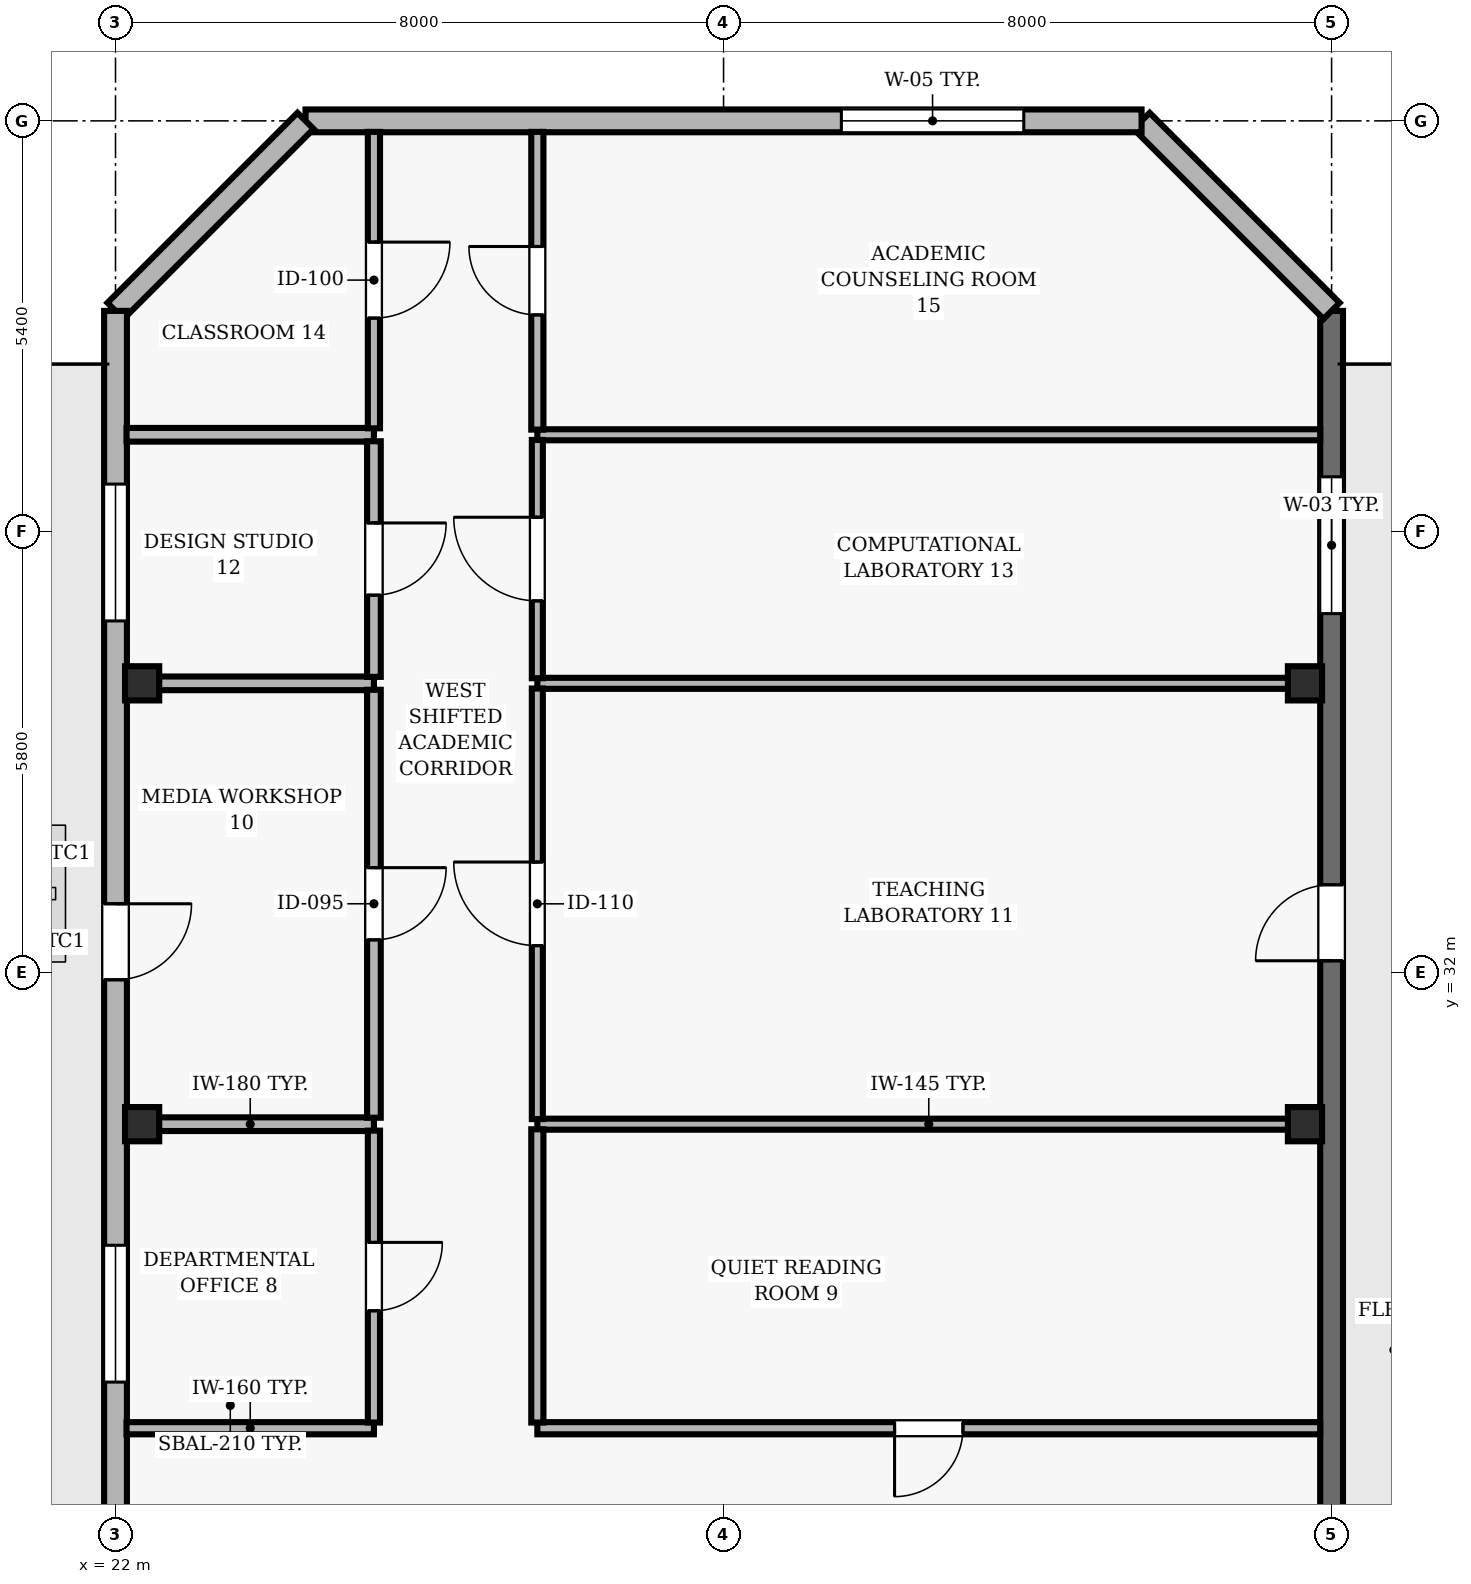
"""IFC4 building model, lengths in metres.
Left out: names, types, materials, properties, quantities, classifications, styles, units other than length and angle.
Written with IfcOpenShell. Run it as: python <this file> out.ifc"""

import sys

from ifc_helpers import new_model, si_unit, direction, frame, frame_2d, origin, origin_2d, place, context, subcontext, project, spatial, rectangle, hollow_rectangle, extrude, element, fill, save


model = new_model("IFC4")
c1 = context("Model", 3, precision=1e-05, world=origin(), true_north=direction((0.0, 1.0)))
c2 = subcontext(c1, "Body", "Model", "MODEL_VIEW")
j1 = project(units=[si_unit("LENGTHUNIT", "METRE"), si_unit("PLANEANGLEUNIT", "RADIAN")], contexts=[c1])
p1 = place(None, origin())
s1 = spatial("IfcSite", under=j1, at=p1, CompositionType="ELEMENT")
p2 = place(p1, origin())
s2 = spatial("IfcBuilding", under=s1, at=p2, CompositionType="ELEMENT")
p3 = place(p2, frame((0.0, 0.0, 222.6)))
s3 = spatial("IfcBuildingStorey", under=s2, at=p3, CompositionType="ELEMENT", Elevation=222.6)
for number, where, z_axis, x_axis in (
    (1, (22.35, 30.0, 0.0), (0.0, 0.0, 1.0), (1.0, 0.0, 0.0)),
    (2, (37.65, 30.0, 0.0), (0.0, 0.0, 1.0), (1.0, 0.0, 0.0)),
    (3, (22.35, 35.8, 0.0), (0.0, 0.0, 1.0), (1.0, 0.0, 0.0)),
    (4, (37.65, 35.8, 0.0), (0.0, 0.0, 1.0), (1.0, 0.0, 0.0)),
):
    element("IfcColumn", number, at=place(p3, frame(where, z_axis=z_axis, x_axis=x_axis)), inside=s3, PredefinedType="COLUMN", context=c2, shape_type="SweptSolid", body=[
        extrude(hollow_rectangle(XDim=0.45, YDim=0.45, WallThickness=0.02, at=origin_2d()), origin(), (0.0, 0.0, 1.0), 3.9),
    ])
p4 = place(p3, frame((38.0, 22.2, 0.0), z_axis=(0.0, 0.0, 1.0), x_axis=(0.0, 1.0, 0.0)))
e5 = element("IfcWall", 5, at=p4, inside=s3, PredefinedType="SOLIDWALL", context=c2, shape_type="SweptSolid", body=[
    extrude(rectangle(XDim=18.5, YDim=0.3, at=frame_2d((9.25, 0.0))), origin(), (0.0, 0.0, 1.0), 3.69),
])
p5 = place(p4, frame((9.95, 0.0, 0.0)))
e6 = element("IfcOpeningElement", 6, at=p5, cuts=e5, PredefinedType="OPENING", context=c2, shape_type="SweptSolid", body=[
    extrude(rectangle(XDim=1.0, YDim=2.2, at=frame_2d((0.5, 1.1))), frame((0.0, 0.16, 0.0), z_axis=(0.0, -1.0, 0.0), x_axis=(1.0, 0.0, 0.0)), (0.0, 0.0, 1.0), 0.32),
])
p6 = place(p4, frame((14.517, 0.0, 0.9)))
e7 = element("IfcOpeningElement", 7, at=p6, cuts=e5, PredefinedType="OPENING", context=c2, shape_type="SweptSolid", body=[
    extrude(rectangle(XDim=1.8, YDim=1.6, at=frame_2d((0.9, 0.8))), frame((0.0, 0.16, 0.0), z_axis=(0.0, -1.0, 0.0), x_axis=(1.0, 0.0, 0.0)), (0.0, 0.0, 1.0), 0.32),
])
p7 = place(p3, frame((38.0, 40.7, 0.0), z_axis=(0.0, 0.0, 1.0), x_axis=(-0.707106781187, 0.707106781187, 0.0)))
e8 = element("IfcWall", 8, at=p7, inside=s3, PredefinedType="SOLIDWALL", context=c2, shape_type="SweptSolid", body=[
    extrude(rectangle(XDim=3.536, YDim=0.3, at=frame_2d((1.768, 0.0))), origin(), (0.0, 0.0, 1.0), 3.69),
])
p8 = place(p3, frame((35.5, 43.2, 0.0), z_axis=(0.0, 0.0, 1.0), x_axis=(-1.0, 0.0, 0.0)))
e9 = element("IfcWall", 9, at=p8, inside=s3, PredefinedType="SOLIDWALL", context=c2, shape_type="SweptSolid", body=[
    extrude(rectangle(XDim=11.0, YDim=0.3, at=frame_2d((5.5, 0.0))), origin(), (0.0, 0.0, 1.0), 3.69),
])
p9 = place(p8, frame((1.55, 0.0, 0.9)))
e10 = element("IfcOpeningElement", 10, at=p9, cuts=e9, PredefinedType="OPENING", context=c2, shape_type="SweptSolid", body=[
    extrude(rectangle(XDim=2.4, YDim=1.6, at=frame_2d((1.2, 0.8))), frame((0.0, 0.16, 0.0), z_axis=(0.0, -1.0, 0.0), x_axis=(1.0, 0.0, 0.0)), (0.0, 0.0, 1.0), 0.32),
])
p10 = place(p3, frame((24.5, 43.2, 0.0), z_axis=(0.0, 0.0, 1.0), x_axis=(-0.707106781187, -0.707106781187, 0.0)))
e11 = element("IfcWall", 11, at=p10, inside=s3, PredefinedType="SOLIDWALL", context=c2, shape_type="SweptSolid", body=[
    extrude(rectangle(XDim=3.536, YDim=0.3, at=frame_2d((1.768, 0.0))), origin(), (0.0, 0.0, 1.0), 3.69),
])
p11 = place(p3, frame((22.0, 40.7, 0.0), z_axis=(0.0, 0.0, 1.0), x_axis=(0.0, -1.0, 0.0)))
e12 = element("IfcWall", 12, at=p11, inside=s3, PredefinedType="SOLIDWALL", context=c2, shape_type="SweptSolid", body=[
    extrude(rectangle(XDim=38.2, YDim=0.3, at=frame_2d((19.1, 0.0))), origin(), (0.0, 0.0, 1.0), 3.69),
])
p12 = place(p11, frame((7.8, 0.0, 0.0)))
e13 = element("IfcOpeningElement", 13, at=p12, cuts=e12, PredefinedType="OPENING", context=c2, shape_type="SweptSolid", body=[
    extrude(rectangle(XDim=1.0, YDim=2.2, at=frame_2d((0.5, 1.1))), frame((0.0, 0.16, 0.0), z_axis=(0.0, -1.0, 0.0), x_axis=(1.0, 0.0, 0.0)), (0.0, 0.0, 1.0), 0.32),
])
p13 = place(p11, frame((2.279, 0.0, 0.9)))
e14 = element("IfcOpeningElement", 14, at=p13, cuts=e12, PredefinedType="OPENING", context=c2, shape_type="SweptSolid", body=[
    extrude(rectangle(XDim=1.8, YDim=1.8, at=frame_2d((0.9, 0.9))), frame((0.0, 0.16, 0.0), z_axis=(0.0, -1.0, 0.0), x_axis=(1.0, 0.0, 0.0)), (0.0, 0.0, 1.0), 0.32),
])
p14 = place(p11, frame((12.293, 0.0, 0.9)))
e15 = element("IfcOpeningElement", 15, at=p14, cuts=e12, PredefinedType="OPENING", context=c2, shape_type="SweptSolid", body=[
    extrude(rectangle(XDim=1.8, YDim=1.8, at=frame_2d((0.9, 0.9))), frame((0.0, 0.16, 0.0), z_axis=(0.0, -1.0, 0.0), x_axis=(1.0, 0.0, 0.0)), (0.0, 0.0, 1.0), 0.32),
])
p15 = place(p11, frame((18.2, 0.0, 0.9)))
e16 = element("IfcOpeningElement", 16, at=p15, cuts=e12, PredefinedType="OPENING", context=c2, shape_type="SweptSolid", body=[
    extrude(rectangle(XDim=1.8, YDim=1.8, at=frame_2d((0.9, 0.9))), frame((0.0, 0.16, 0.0), z_axis=(0.0, -1.0, 0.0), x_axis=(1.0, 0.0, 0.0)), (0.0, 0.0, 1.0), 0.32),
])
p16 = place(p11, frame((23.207, 0.0, 0.9)))
e17 = element("IfcOpeningElement", 17, at=p16, cuts=e12, PredefinedType="OPENING", context=c2, shape_type="SweptSolid", body=[
    extrude(rectangle(XDim=1.8, YDim=1.8, at=frame_2d((0.9, 0.9))), frame((0.0, 0.16, 0.0), z_axis=(0.0, -1.0, 0.0), x_axis=(1.0, 0.0, 0.0)), (0.0, 0.0, 1.0), 0.32),
])
p17 = place(p11, frame((29.114, 0.0, 0.9)))
e18 = element("IfcOpeningElement", 18, at=p17, cuts=e12, PredefinedType="OPENING", context=c2, shape_type="SweptSolid", body=[
    extrude(rectangle(XDim=1.8, YDim=1.8, at=frame_2d((0.9, 0.9))), frame((0.0, 0.16, 0.0), z_axis=(0.0, -1.0, 0.0), x_axis=(1.0, 0.0, 0.0)), (0.0, 0.0, 1.0), 0.32),
])
p18 = place(p3, frame((25.4, 26.0, 0.0), z_axis=(0.0, 0.0, 1.0), x_axis=(-1.0, 0.0, 0.0)))
e19 = element("IfcWall", 19, at=p18, inside=s3, PredefinedType="PARTITIONING", context=c2, shape_type="SweptSolid", body=[
    extrude(rectangle(XDim=3.255, YDim=0.16, at=frame_2d((1.627, 0.0))), origin(), (0.0, 0.0, 1.0), 3.69),
])
for number, where, z_axis, x_axis in (
    (20, (25.4, 30.0, 0.0), (0.0, 0.0, 1.0), (-1.0, 0.0, 0.0)),
    (21, (25.4, 35.8, 0.0), (0.0, 0.0, 1.0), (-1.0, 0.0, 0.0)),
):
    element("IfcWall", number, at=place(p3, frame(where, z_axis=z_axis, x_axis=x_axis)), inside=s3, PredefinedType="PARTITIONING", context=c2, shape_type="SweptSolid", body=[
        extrude(rectangle(XDim=3.255, YDim=0.18, at=frame_2d((1.627, 0.0))), origin(), (0.0, 0.0, 1.0), 3.139),
    ])
p19 = place(p3, frame((25.4, 39.07, 0.0), z_axis=(0.0, 0.0, 1.0), x_axis=(-1.0, 0.0, 0.0)))
e22 = element("IfcWall", 22, at=p19, inside=s3, PredefinedType="PARTITIONING", context=c2, shape_type="SweptSolid", body=[
    extrude(rectangle(XDim=3.255, YDim=0.18, at=frame_2d((1.627, 0.0))), origin(), (0.0, 0.0, 1.0), 3.69),
])
p20 = place(p3, frame((37.85, 26.0, 0.0), z_axis=(0.0, 0.0, 1.0), x_axis=(-1.0, 0.0, 0.0)))
e23 = element("IfcWall", 23, at=p20, inside=s3, PredefinedType="PARTITIONING", context=c2, shape_type="SweptSolid", body=[
    extrude(rectangle(XDim=10.3, YDim=0.16, at=frame_2d((5.15, 0.0))), origin(), (0.0, 0.0, 1.0), 3.69),
])
p21 = place(p20, frame((4.7, 0.0, 0.0)))
e24 = element("IfcOpeningElement", 24, at=p21, cuts=e23, PredefinedType="OPENING", context=c2, shape_type="SweptSolid", body=[
    extrude(rectangle(XDim=0.9, YDim=2.1, at=frame_2d((0.45, 1.05))), frame((0.0, 0.09, 0.0), z_axis=(0.0, -1.0, 0.0), x_axis=(1.0, 0.0, 0.0)), (0.0, 0.0, 1.0), 0.18),
])
for number, where, z_axis, x_axis in (
    (25, (37.85, 30.0, 0.0), (0.0, 0.0, 1.0), (-1.0, 0.0, 0.0)),
    (26, (37.85, 35.8, 0.0), (0.0, 0.0, 1.0), (-1.0, 0.0, 0.0)),
):
    element("IfcWall", number, at=place(p3, frame(where, z_axis=z_axis, x_axis=x_axis)), inside=s3, PredefinedType="PARTITIONING", context=c2, shape_type="SweptSolid", body=[
        extrude(rectangle(XDim=10.3, YDim=0.145, at=frame_2d((5.15, 0.0))), origin(), (0.0, 0.0, 1.0), 3.139),
    ])
p22 = place(p3, frame((37.85, 39.07, 0.0), z_axis=(0.0, 0.0, 1.0), x_axis=(-1.0, 0.0, 0.0)))
e27 = element("IfcWall", 27, at=p22, inside=s3, PredefinedType="PARTITIONING", context=c2, shape_type="SweptSolid", body=[
    extrude(rectangle(XDim=10.3, YDim=0.145, at=frame_2d((5.15, 0.0))), origin(), (0.0, 0.0, 1.0), 3.69),
])
p23 = place(p3, frame((25.4, 29.915, 0.0), z_axis=(0.0, 0.0, 1.0), x_axis=(0.0, -1.0, 0.0)))
e28 = element("IfcWall", 28, at=p23, inside=s3, PredefinedType="PARTITIONING", context=c2, shape_type="SweptSolid", body=[
    extrude(rectangle(XDim=3.84, YDim=0.16, at=frame_2d((1.92, 0.0))), origin(), (0.0, 0.0, 1.0), 3.69),
])
p24 = place(p23, frame((1.47, 0.0, 0.0)))
e29 = element("IfcOpeningElement", 29, at=p24, cuts=e28, PredefinedType="OPENING", context=c2, shape_type="SweptSolid", body=[
    extrude(rectangle(XDim=0.9, YDim=2.1, at=frame_2d((0.45, 1.05))), frame((0.0, 0.09, 0.0), z_axis=(0.0, -1.0, 0.0), x_axis=(1.0, 0.0, 0.0)), (0.0, 0.0, 1.0), 0.18),
])
p25 = place(p3, frame((25.4, 35.715, 0.0), z_axis=(0.0, 0.0, 1.0), x_axis=(0.0, -1.0, 0.0)))
e30 = element("IfcWall", 30, at=p25, inside=s3, PredefinedType="PARTITIONING", context=c2, shape_type="SweptSolid", body=[
    extrude(rectangle(XDim=5.63, YDim=0.18, at=frame_2d((2.815, 0.0))), origin(), (0.0, 0.0, 1.0), 3.69),
])
p26 = place(p25, frame((2.34, 0.0, 0.0)))
e31 = element("IfcOpeningElement", 31, at=p26, cuts=e30, PredefinedType="OPENING", context=c2, shape_type="SweptSolid", body=[
    extrude(rectangle(XDim=0.95, YDim=2.1, at=frame_2d((0.475, 1.05))), frame((0.0, 0.1, 0.0), z_axis=(0.0, -1.0, 0.0), x_axis=(1.0, 0.0, 0.0)), (0.0, 0.0, 1.0), 0.2),
])
p27 = place(p3, frame((25.4, 38.985, 0.0), z_axis=(0.0, 0.0, 1.0), x_axis=(0.0, -1.0, 0.0)))
e32 = element("IfcWall", 32, at=p27, inside=s3, PredefinedType="PARTITIONING", context=c2, shape_type="SweptSolid", body=[
    extrude(rectangle(XDim=3.1, YDim=0.18, at=frame_2d((1.55, 0.0))), origin(), (0.0, 0.0, 1.0), 3.69),
])
p28 = place(p27, frame((1.075, 0.0, 0.0)))
e33 = element("IfcOpeningElement", 33, at=p28, cuts=e32, PredefinedType="OPENING", context=c2, shape_type="SweptSolid", body=[
    extrude(rectangle(XDim=0.95, YDim=2.1, at=frame_2d((0.475, 1.05))), frame((0.0, 0.1, 0.0), z_axis=(0.0, -1.0, 0.0), x_axis=(1.0, 0.0, 0.0)), (0.0, 0.0, 1.0), 0.2),
])
p29 = place(p3, frame((25.4, 43.055, 0.0), z_axis=(0.0, 0.0, 1.0), x_axis=(0.0, -1.0, 0.0)))
e34 = element("IfcWall", 34, at=p29, inside=s3, PredefinedType="PARTITIONING", context=c2, shape_type="SweptSolid", body=[
    extrude(rectangle(XDim=3.9, YDim=0.16, at=frame_2d((1.95, 0.0))), origin(), (0.0, 0.0, 1.0), 3.69),
])
p30 = place(p29, frame((1.45, 0.0, 0.0)))
e35 = element("IfcOpeningElement", 35, at=p30, cuts=e34, PredefinedType="OPENING", context=c2, shape_type="SweptSolid", body=[
    extrude(rectangle(XDim=1.0, YDim=2.1, at=frame_2d((0.5, 1.05))), frame((0.0, 0.09, 0.0), z_axis=(0.0, -1.0, 0.0), x_axis=(1.0, 0.0, 0.0)), (0.0, 0.0, 1.0), 0.18),
])
p31 = place(p3, frame((27.55, 26.075, 0.0), z_axis=(0.0, 0.0, 1.0), x_axis=(0.0, 1.0, 0.0)))
e36 = element("IfcWall", 36, at=p31, inside=s3, PredefinedType="PARTITIONING", context=c2, shape_type="SweptSolid", body=[
    extrude(rectangle(XDim=3.858, YDim=0.16, at=frame_2d((1.929, 0.0))), origin(), (0.0, 0.0, 1.0), 3.69),
])
p32 = place(p3, frame((27.55, 30.067, 0.0), z_axis=(0.0, 0.0, 1.0), x_axis=(0.0, 1.0, 0.0)))
e37 = element("IfcWall", 37, at=p32, inside=s3, PredefinedType="PARTITIONING", context=c2, shape_type="SweptSolid", body=[
    extrude(rectangle(XDim=5.665, YDim=0.145, at=frame_2d((2.833, 0.0))), origin(), (0.0, 0.0, 1.0), 3.69),
])
p33 = place(p32, frame((2.282, 0.0, 0.0)))
e38 = element("IfcOpeningElement", 38, at=p33, cuts=e37, PredefinedType="OPENING", context=c2, shape_type="SweptSolid", body=[
    extrude(rectangle(XDim=1.1, YDim=2.15, at=frame_2d((0.55, 1.075))), frame((0.0, 0.083, 0.0), z_axis=(0.0, -1.0, 0.0), x_axis=(1.0, 0.0, 0.0)), (0.0, 0.0, 1.0), 0.165),
])
p34 = place(p3, frame((27.55, 35.867, 0.0), z_axis=(0.0, 0.0, 1.0), x_axis=(0.0, 1.0, 0.0)))
e39 = element("IfcWall", 39, at=p34, inside=s3, PredefinedType="PARTITIONING", context=c2, shape_type="SweptSolid", body=[
    extrude(rectangle(XDim=3.135, YDim=0.145, at=frame_2d((1.567, 0.0))), origin(), (0.0, 0.0, 1.0), 3.69),
])
p35 = place(p34, frame((1.018, 0.0, 0.0)))
e40 = element("IfcOpeningElement", 40, at=p35, cuts=e39, PredefinedType="OPENING", context=c2, shape_type="SweptSolid", body=[
    extrude(rectangle(XDim=1.1, YDim=2.15, at=frame_2d((0.55, 1.075))), frame((0.0, 0.083, 0.0), z_axis=(0.0, -1.0, 0.0), x_axis=(1.0, 0.0, 0.0)), (0.0, 0.0, 1.0), 0.165),
])
p36 = place(p3, frame((27.55, 39.138, 0.0), z_axis=(0.0, 0.0, 1.0), x_axis=(0.0, 1.0, 0.0)))
e41 = element("IfcWall", 41, at=p36, inside=s3, PredefinedType="PARTITIONING", context=c2, shape_type="SweptSolid", body=[
    extrude(rectangle(XDim=3.917, YDim=0.16, at=frame_2d((1.958, 0.0))), origin(), (0.0, 0.0, 1.0), 3.69),
])
p37 = place(p36, frame((1.509, 0.0, 0.0)))
e42 = element("IfcOpeningElement", 42, at=p37, cuts=e41, PredefinedType="OPENING", context=c2, shape_type="SweptSolid", body=[
    extrude(rectangle(XDim=0.9, YDim=2.1, at=frame_2d((0.45, 1.05))), frame((0.0, 0.09, 0.0), z_axis=(0.0, -1.0, 0.0), x_axis=(1.0, 0.0, 0.0)), (0.0, 0.0, 1.0), 0.18),
])
p38 = place(p5, origin())
e43 = element("IfcDoor", 43, at=p38, inside=s3, OperationType="SINGLE_SWING_LEFT", PredefinedType="DOOR", context=c2, shape_type="SweptSolid", body=[
    extrude(rectangle(XDim=1.0, YDim=2.2, at=frame_2d((0.5, 1.1))), frame((0.0, 0.025, 0.0), z_axis=(0.0, -1.0, 0.0), x_axis=(1.0, 0.0, 0.0)), (0.0, 0.0, 1.0), 0.05),
])
fill(e6, e43)
p39 = place(p6, origin())
e44 = element("IfcWindow", 44, at=p39, inside=s3, PartitioningType="SINGLE_PANEL", PredefinedType="WINDOW", context=c2, shape_type="SweptSolid", body=[
    extrude(rectangle(XDim=1.8, YDim=1.6, at=frame_2d((0.9, 0.8))), frame((0.0, 0.03, 0.0), z_axis=(0.0, -1.0, 0.0), x_axis=(1.0, 0.0, 0.0)), (0.0, 0.0, 1.0), 0.06),
])
fill(e7, e44)
p40 = place(p9, origin())
e45 = element("IfcWindow", 45, at=p40, inside=s3, PartitioningType="SINGLE_PANEL", PredefinedType="WINDOW", context=c2, shape_type="SweptSolid", body=[
    extrude(rectangle(XDim=2.4, YDim=1.6, at=frame_2d((1.2, 0.8))), frame((0.0, 0.03, 0.0), z_axis=(0.0, -1.0, 0.0), x_axis=(1.0, 0.0, 0.0)), (0.0, 0.0, 1.0), 0.06),
])
fill(e10, e45)
p41 = place(p12, origin())
e46 = element("IfcDoor", 46, at=p41, inside=s3, OperationType="SINGLE_SWING_LEFT", PredefinedType="DOOR", context=c2, shape_type="SweptSolid", body=[
    extrude(rectangle(XDim=1.0, YDim=2.2, at=frame_2d((0.5, 1.1))), frame((0.0, 0.025, 0.0), z_axis=(0.0, -1.0, 0.0), x_axis=(1.0, 0.0, 0.0)), (0.0, 0.0, 1.0), 0.05),
])
fill(e13, e46)
p42 = place(p13, origin())
e47 = element("IfcWindow", 47, at=p42, inside=s3, PartitioningType="SINGLE_PANEL", PredefinedType="WINDOW", context=c2, shape_type="SweptSolid", body=[
    extrude(rectangle(XDim=1.8, YDim=1.8, at=frame_2d((0.9, 0.9))), frame((0.0, 0.03, 0.0), z_axis=(0.0, -1.0, 0.0), x_axis=(1.0, 0.0, 0.0)), (0.0, 0.0, 1.0), 0.06),
])
fill(e14, e47)
p43 = place(p14, origin())
e48 = element("IfcWindow", 48, at=p43, inside=s3, PartitioningType="SINGLE_PANEL", PredefinedType="WINDOW", context=c2, shape_type="SweptSolid", body=[
    extrude(rectangle(XDim=1.8, YDim=1.8, at=frame_2d((0.9, 0.9))), frame((0.0, 0.03, 0.0), z_axis=(0.0, -1.0, 0.0), x_axis=(1.0, 0.0, 0.0)), (0.0, 0.0, 1.0), 0.06),
])
fill(e15, e48)
p44 = place(p24, origin())
e49 = element("IfcDoor", 49, at=p44, inside=s3, OperationType="SINGLE_SWING_LEFT", PredefinedType="DOOR", context=c2, shape_type="SweptSolid", body=[
    extrude(rectangle(XDim=0.9, YDim=2.1, at=frame_2d((0.45, 1.05))), frame((0.0, 0.025, 0.0), z_axis=(0.0, -1.0, 0.0), x_axis=(1.0, 0.0, 0.0)), (0.0, 0.0, 1.0), 0.05),
])
fill(e29, e49)
p45 = place(p21, origin())
e50 = element("IfcDoor", 50, at=p45, inside=s3, OperationType="SINGLE_SWING_RIGHT", PredefinedType="DOOR", context=c2, shape_type="SweptSolid", body=[
    extrude(rectangle(XDim=0.9, YDim=2.1, at=frame_2d((0.45, 1.05))), frame((0.0, 0.025, 0.0), z_axis=(0.0, -1.0, 0.0), x_axis=(1.0, 0.0, 0.0)), (0.0, 0.0, 1.0), 0.05),
])
fill(e24, e50)
p46 = place(p26, origin())
e51 = element("IfcDoor", 51, at=p46, inside=s3, OperationType="SINGLE_SWING_LEFT", PredefinedType="DOOR", context=c2, shape_type="SweptSolid", body=[
    extrude(rectangle(XDim=0.95, YDim=2.1, at=frame_2d((0.475, 1.05))), frame((0.0, 0.025, 0.0), z_axis=(0.0, -1.0, 0.0), x_axis=(1.0, 0.0, 0.0)), (0.0, 0.0, 1.0), 0.05),
])
fill(e31, e51)
p47 = place(p33, origin())
e52 = element("IfcDoor", 52, at=p47, inside=s3, OperationType="SINGLE_SWING_RIGHT", PredefinedType="DOOR", context=c2, shape_type="SweptSolid", body=[
    extrude(rectangle(XDim=1.1, YDim=2.15, at=frame_2d((0.55, 1.075))), frame((0.0, 0.025, 0.0), z_axis=(0.0, -1.0, 0.0), x_axis=(1.0, 0.0, 0.0)), (0.0, 0.0, 1.0), 0.05),
])
fill(e38, e52)
p48 = place(p28, origin())
e53 = element("IfcDoor", 53, at=p48, inside=s3, OperationType="SINGLE_SWING_LEFT", PredefinedType="DOOR", context=c2, shape_type="SweptSolid", body=[
    extrude(rectangle(XDim=0.95, YDim=2.1, at=frame_2d((0.475, 1.05))), frame((0.0, 0.025, 0.0), z_axis=(0.0, -1.0, 0.0), x_axis=(1.0, 0.0, 0.0)), (0.0, 0.0, 1.0), 0.05),
])
fill(e33, e53)
p49 = place(p35, origin())
e54 = element("IfcDoor", 54, at=p49, inside=s3, OperationType="SINGLE_SWING_RIGHT", PredefinedType="DOOR", context=c2, shape_type="SweptSolid", body=[
    extrude(rectangle(XDim=1.1, YDim=2.15, at=frame_2d((0.55, 1.075))), frame((0.0, 0.025, 0.0), z_axis=(0.0, -1.0, 0.0), x_axis=(1.0, 0.0, 0.0)), (0.0, 0.0, 1.0), 0.05),
])
fill(e40, e54)
p50 = place(p30, origin())
e55 = element("IfcDoor", 55, at=p50, inside=s3, OperationType="SINGLE_SWING_LEFT", PredefinedType="DOOR", context=c2, shape_type="SweptSolid", body=[
    extrude(rectangle(XDim=1.0, YDim=2.1, at=frame_2d((0.5, 1.05))), frame((0.0, 0.025, 0.0), z_axis=(0.0, -1.0, 0.0), x_axis=(1.0, 0.0, 0.0)), (0.0, 0.0, 1.0), 0.05),
])
fill(e35, e55)
p51 = place(p37, origin())
e56 = element("IfcDoor", 56, at=p51, inside=s3, OperationType="SINGLE_SWING_RIGHT", PredefinedType="DOOR", context=c2, shape_type="SweptSolid", body=[
    extrude(rectangle(XDim=0.9, YDim=2.1, at=frame_2d((0.45, 1.05))), frame((0.0, 0.025, 0.0), z_axis=(0.0, -1.0, 0.0), x_axis=(1.0, 0.0, 0.0)), (0.0, 0.0, 1.0), 0.05),
])
fill(e42, e56)
save(model, sys.argv[1])
